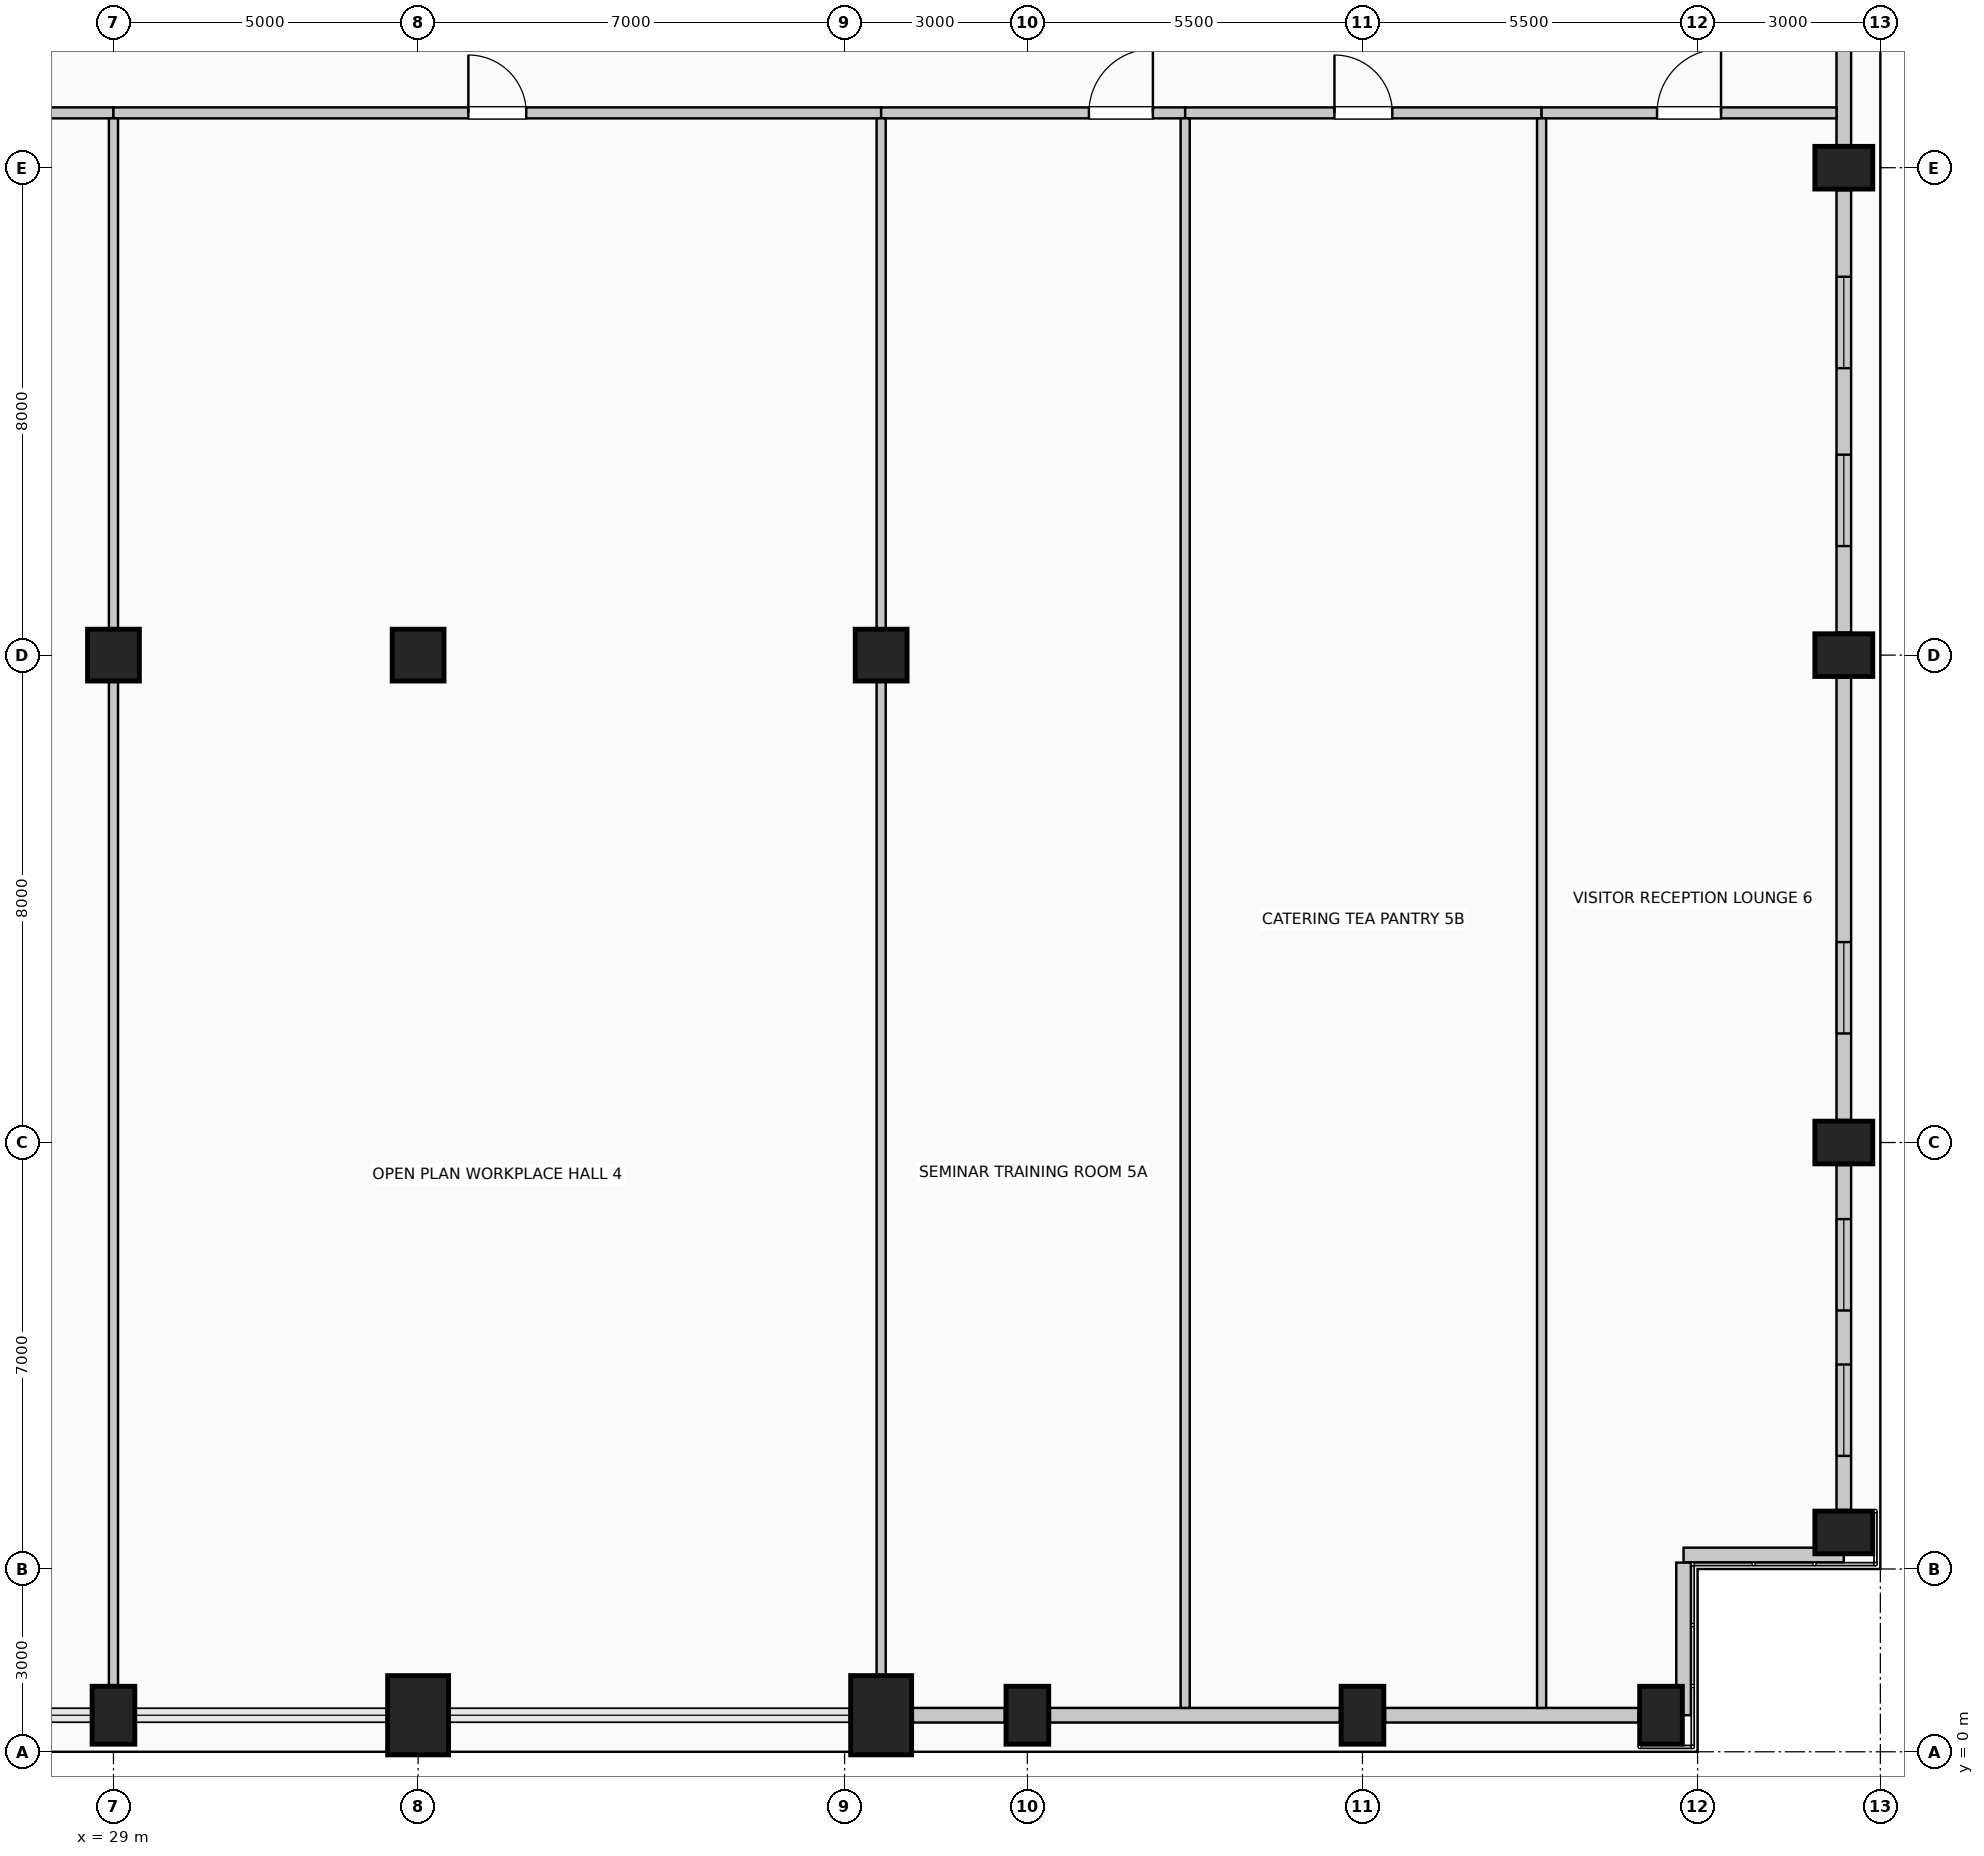
"""IFC4 building model, lengths in metres.
Left out: names, types, materials, properties, quantities, classifications, styles, units other than length and angle.
Written with IfcOpenShell. Run it as: python <this file> out.ifc"""

import sys

from ifc_helpers import new_model, si_unit, direction, frame, frame_2d, origin, origin_2d, place, context, subcontext, project, spatial, rectangle, circle, extrude, element, fill, save


model = new_model("IFC4")
c1 = context("Model", 3, precision=1e-05, world=origin(), true_north=direction((0.0, 1.0)))
c2 = subcontext(c1, "Body", "Model", "MODEL_VIEW")
j1 = project(units=[si_unit("LENGTHUNIT", "METRE"), si_unit("PLANEANGLEUNIT", "RADIAN")], contexts=[c1])
p1 = place(None, origin())
s1 = spatial("IfcSite", under=j1, at=p1, CompositionType="ELEMENT")
p2 = place(p1, origin())
s2 = spatial("IfcBuilding", under=s1, at=p2, CompositionType="ELEMENT")
p3 = place(p2, frame((0.0, 0.0, 285.0)))
s3 = spatial("IfcBuildingStorey", under=s2, at=p3, CompositionType="ELEMENT", Elevation=285.0)
p4 = place(p3, frame((29.0, 0.6, 0.0), z_axis=(0.0, 0.0, 1.0), x_axis=(1.0, 0.0, 0.0)))
e1 = element("IfcColumn", 1, at=p4, inside=s3, PredefinedType="COLUMN", context=c2, shape_type="SweptSolid", body=[
    extrude(rectangle(XDim=0.7, YDim=0.95, at=origin_2d()), origin(), (0.0, 0.0, 1.0), 4.0),
])
for number, where, z_axis, x_axis in (
    (2, (34.0, 0.6, 0.0), (0.0, 0.0, 1.0), (1.0, 0.0, 0.0)),
    (3, (41.6, 0.6, 0.0), (0.0, 0.0, 1.0), (1.0, 0.0, 0.0)),
):
    element("IfcColumn", number, at=place(p3, frame(where, z_axis=z_axis, x_axis=x_axis)), inside=s3, PredefinedType="COLUMN", context=c2, shape_type="SweptSolid", body=[
        extrude(rectangle(XDim=1.0, YDim=1.3, at=origin_2d()), origin(), (0.0, 0.0, 1.0), 4.0),
    ])
for number, where, z_axis, x_axis in (
    (4, (44.0, 0.6, 0.0), (0.0, 0.0, 1.0), (1.0, 0.0, 0.0)),
    (5, (49.5, 0.6, 0.0), (0.0, 0.0, 1.0), (1.0, 0.0, 0.0)),
    (6, (54.4, 0.6, 0.0), (0.0, 0.0, 1.0), (1.0, 0.0, 0.0)),
    (7, (57.4, 3.6, 0.0), (0.0, 0.0, 1.0), (0.0, 1.0, 0.0)),
    (8, (57.4, 10.0, 0.0), (0.0, 0.0, 1.0), (0.0, 1.0, 0.0)),
    (9, (57.4, 18.0, 0.0), (0.0, 0.0, 1.0), (0.0, 1.0, 0.0)),
    (10, (57.4, 26.0, 0.0), (0.0, 0.0, 1.0), (0.0, 1.0, 0.0)),
):
    element("IfcColumn", number, at=place(p3, frame(where, z_axis=z_axis, x_axis=x_axis)), inside=s3, PredefinedType="COLUMN", context=c2, shape_type="SweptSolid", body=[
        extrude(rectangle(XDim=0.7, YDim=0.95, at=origin_2d()), origin(), (0.0, 0.0, 1.0), 4.0),
    ])
for number, where, z_axis, x_axis in (
    (11, (29.0, 18.0, 0.0), (0.0, 0.0, 1.0), (1.0, 0.0, 0.0)),
    (12, (41.6, 18.0, 0.0), (0.0, 0.0, 1.0), (1.0, 0.0, 0.0)),
    (13, (34.0, 18.0, 0.0), (0.0, 0.0, 1.0), (1.0, 0.0, 0.0)),
):
    element("IfcColumn", number, at=place(p3, frame(where, z_axis=z_axis, x_axis=x_axis)), inside=s3, PredefinedType="COLUMN", context=c2, shape_type="SweptSolid", body=[
        extrude(circle(Radius=0.425, at=origin_2d()), origin(), (0.0, 0.0, 1.0), 4.0),
    ])
p5 = place(p3, frame((43.63, 0.6, 0.0), z_axis=(0.0, 0.0, 1.0), x_axis=(-1.0, 0.0, 0.0)))
e14 = element("IfcWall", 14, at=p5, inside=s3, PredefinedType="SOLIDWALL", context=c2, shape_type="SweptSolid", body=[
    extrude(rectangle(XDim=1.51, YDim=0.24, at=frame_2d((0.755, 0.0))), origin(), (0.0, 0.0, 1.0), 2.165),
])
p6 = place(p3, frame((49.13, 0.6, 0.0), z_axis=(0.0, 0.0, 1.0), x_axis=(-1.0, 0.0, 0.0)))
e15 = element("IfcWall", 15, at=p6, inside=s3, PredefinedType="SOLIDWALL", context=c2, shape_type="SweptSolid", body=[
    extrude(rectangle(XDim=4.76, YDim=0.24, at=frame_2d((2.38, 0.0))), origin(), (0.0, 0.0, 1.0), 2.165),
])
p7 = place(p3, frame((54.03, 0.6, 0.0), z_axis=(0.0, 0.0, 1.0), x_axis=(-1.0, 0.0, 0.0)))
e16 = element("IfcWall", 16, at=p7, inside=s3, PredefinedType="SOLIDWALL", context=c2, shape_type="SweptSolid", body=[
    extrude(rectangle(XDim=4.16, YDim=0.24, at=frame_2d((2.08, 0.0))), origin(), (0.0, 0.0, 1.0), 2.165),
])
p8 = place(p3, frame((57.4, 9.63, 0.0), z_axis=(0.0, 0.0, 1.0), x_axis=(0.0, -1.0, 0.0)))
e17 = element("IfcWall", 17, at=p8, inside=s3, PredefinedType="SOLIDWALL", context=c2, shape_type="SweptSolid", body=[
    extrude(rectangle(XDim=5.66, YDim=0.24, at=frame_2d((2.83, 0.0))), origin(), (0.0, 0.0, 1.0), 3.015),
])
p9 = place(p8, frame((0.887, 0.0, 0.42)))
e18 = element("IfcOpeningElement", 18, at=p9, cuts=e17, PredefinedType="OPENING", context=c2, shape_type="SweptSolid", body=[
    extrude(rectangle(XDim=1.5, YDim=2.2, at=frame_2d((0.75, 1.1))), frame((0.0, 0.13, 0.0), z_axis=(0.0, -1.0, 0.0), x_axis=(1.0, 0.0, 0.0)), (0.0, 0.0, 1.0), 0.26),
])
p10 = place(p8, frame((3.273, 0.0, 0.42)))
e19 = element("IfcOpeningElement", 19, at=p10, cuts=e17, PredefinedType="OPENING", context=c2, shape_type="SweptSolid", body=[
    extrude(rectangle(XDim=1.5, YDim=2.2, at=frame_2d((0.75, 1.1))), frame((0.0, 0.13, 0.0), z_axis=(0.0, -1.0, 0.0), x_axis=(1.0, 0.0, 0.0)), (0.0, 0.0, 1.0), 0.26),
])
p11 = place(p3, frame((57.4, 17.63, 0.0), z_axis=(0.0, 0.0, 1.0), x_axis=(0.0, -1.0, 0.0)))
e20 = element("IfcWall", 20, at=p11, inside=s3, PredefinedType="SOLIDWALL", context=c2, shape_type="SweptSolid", body=[
    extrude(rectangle(XDim=7.26, YDim=0.24, at=frame_2d((3.63, 0.0))), origin(), (0.0, 0.0, 1.0), 3.015),
])
p12 = place(p11, frame((4.34, 0.0, 0.42)))
e21 = element("IfcOpeningElement", 21, at=p12, cuts=e20, PredefinedType="OPENING", context=c2, shape_type="SweptSolid", body=[
    extrude(rectangle(XDim=1.5, YDim=2.2, at=frame_2d((0.75, 1.1))), frame((0.0, 0.13, 0.0), z_axis=(0.0, -1.0, 0.0), x_axis=(1.0, 0.0, 0.0)), (0.0, 0.0, 1.0), 0.26),
])
p13 = place(p3, frame((57.4, 25.63, 0.0), z_axis=(0.0, 0.0, 1.0), x_axis=(0.0, -1.0, 0.0)))
e22 = element("IfcWall", 22, at=p13, inside=s3, PredefinedType="SOLIDWALL", context=c2, shape_type="SweptSolid", body=[
    extrude(rectangle(XDim=7.26, YDim=0.24, at=frame_2d((3.63, 0.0))), origin(), (0.0, 0.0, 1.0), 3.015),
])
p14 = place(p13, frame((1.42, 0.0, 0.42)))
e23 = element("IfcOpeningElement", 23, at=p14, cuts=e22, PredefinedType="OPENING", context=c2, shape_type="SweptSolid", body=[
    extrude(rectangle(XDim=1.5, YDim=2.2, at=frame_2d((0.75, 1.1))), frame((0.0, 0.13, 0.0), z_axis=(0.0, -1.0, 0.0), x_axis=(1.0, 0.0, 0.0)), (0.0, 0.0, 1.0), 0.26),
])
p15 = place(p13, frame((4.34, 0.0, 0.42)))
e24 = element("IfcOpeningElement", 24, at=p15, cuts=e22, PredefinedType="OPENING", context=c2, shape_type="SweptSolid", body=[
    extrude(rectangle(XDim=1.5, YDim=2.2, at=frame_2d((0.75, 1.1))), frame((0.0, 0.13, 0.0), z_axis=(0.0, -1.0, 0.0), x_axis=(1.0, 0.0, 0.0)), (0.0, 0.0, 1.0), 0.26),
])
p16 = place(p3, frame((57.4, 33.63, 0.0), z_axis=(0.0, 0.0, 1.0), x_axis=(0.0, -1.0, 0.0)))
e25 = element("IfcWall", 25, at=p16, inside=s3, PredefinedType="SOLIDWALL", context=c2, shape_type="SweptSolid", body=[
    extrude(rectangle(XDim=7.26, YDim=0.24, at=frame_2d((3.63, 0.0))), origin(), (0.0, 0.0, 1.0), 3.015),
])
p17 = place(p3, frame((57.4, 3.23, 0.0), z_axis=(0.0, 0.0, 1.0), x_axis=(-1.0, 0.0, 0.0)))
e26 = element("IfcWall", 26, at=p17, inside=s3, PredefinedType="SOLIDWALL", context=c2, shape_type="SweptSolid", body=[
    extrude(rectangle(XDim=2.63, YDim=0.24, at=frame_2d((1.315, 0.0))), origin(), (0.0, 0.0, 1.0), 2.165),
])
p18 = place(p3, frame((54.77, 3.105, 0.0), z_axis=(0.0, 0.0, 1.0), x_axis=(0.0, -1.0, 0.0)))
e27 = element("IfcWall", 27, at=p18, inside=s3, PredefinedType="SOLIDWALL", context=c2, shape_type="SweptSolid", body=[
    extrude(rectangle(XDim=2.505, YDim=0.24, at=frame_2d((1.252, 0.0))), origin(), (0.0, 0.0, 1.0), 2.165),
])
p19 = place(p3, frame((23.1, 26.9, 0.0), z_axis=(0.0, 0.0, 1.0), x_axis=(1.0, 0.0, 0.0)))
e28 = element("IfcWall", 28, at=p19, inside=s3, PredefinedType="PARTITIONING", context=c2, shape_type="SweptSolid", body=[
    extrude(rectangle(XDim=5.9, YDim=0.18, at=frame_2d((2.95, 0.0))), origin(), (0.0, 0.0, 1.0), 3.775),
])
p20 = place(p19, frame((2.51, 0.0, 0.0)))
e29 = element("IfcOpeningElement", 29, at=p20, cuts=e28, PredefinedType="OPENING", context=c2, shape_type="SweptSolid", body=[
    extrude(rectangle(XDim=0.88, YDim=2.1, at=frame_2d((0.44, 1.05))), frame((0.0, 0.1, 0.0), z_axis=(0.0, -1.0, 0.0), x_axis=(1.0, 0.0, 0.0)), (0.0, 0.0, 1.0), 0.2),
])
p21 = place(p3, frame((29.0, 26.9, 0.0), z_axis=(0.0, 0.0, 1.0), x_axis=(1.0, 0.0, 0.0)))
e30 = element("IfcWall", 30, at=p21, inside=s3, PredefinedType="PARTITIONING", context=c2, shape_type="SweptSolid", body=[
    extrude(rectangle(XDim=12.6, YDim=0.18, at=frame_2d((6.3, 0.0))), origin(), (0.0, 0.0, 1.0), 3.775),
])
p22 = place(p21, frame((5.825, 0.0, 0.0)))
e31 = element("IfcOpeningElement", 31, at=p22, cuts=e30, PredefinedType="OPENING", context=c2, shape_type="SweptSolid", body=[
    extrude(rectangle(XDim=0.95, YDim=2.15, at=frame_2d((0.475, 1.075))), frame((0.0, 0.1, 0.0), z_axis=(0.0, -1.0, 0.0), x_axis=(1.0, 0.0, 0.0)), (0.0, 0.0, 1.0), 0.2),
])
p23 = place(p3, frame((41.6, 26.9, 0.0), z_axis=(0.0, 0.0, 1.0), x_axis=(1.0, 0.0, 0.0)))
e32 = element("IfcWall", 32, at=p23, inside=s3, PredefinedType="PARTITIONING", context=c2, shape_type="SweptSolid", body=[
    extrude(rectangle(XDim=4.99, YDim=0.18, at=frame_2d((2.495, 0.0))), origin(), (0.0, 0.0, 1.0), 3.775),
])
p24 = place(p23, frame((3.41, 0.0, 0.0)))
e33 = element("IfcOpeningElement", 33, at=p24, cuts=e32, PredefinedType="OPENING", context=c2, shape_type="SweptSolid", body=[
    extrude(rectangle(XDim=1.05, YDim=2.15, at=frame_2d((0.525, 1.075))), frame((0.0, 0.1, 0.0), z_axis=(0.0, -1.0, 0.0), x_axis=(1.0, 0.0, 0.0)), (0.0, 0.0, 1.0), 0.2),
])
p25 = place(p3, frame((46.59, 26.9, 0.0), z_axis=(0.0, 0.0, 1.0), x_axis=(1.0, 0.0, 0.0)))
e34 = element("IfcWall", 34, at=p25, inside=s3, PredefinedType="PARTITIONING", context=c2, shape_type="SweptSolid", body=[
    extrude(rectangle(XDim=5.85, YDim=0.18, at=frame_2d((2.925, 0.0))), origin(), (0.0, 0.0, 1.0), 3.775),
])
p26 = place(p25, frame((2.45, 0.0, 0.0)))
e35 = element("IfcOpeningElement", 35, at=p26, cuts=e34, PredefinedType="OPENING", context=c2, shape_type="SweptSolid", body=[
    extrude(rectangle(XDim=0.95, YDim=2.15, at=frame_2d((0.475, 1.075))), frame((0.0, 0.1, 0.0), z_axis=(0.0, -1.0, 0.0), x_axis=(1.0, 0.0, 0.0)), (0.0, 0.0, 1.0), 0.2),
])
p27 = place(p3, frame((52.44, 26.9, 0.0), z_axis=(0.0, 0.0, 1.0), x_axis=(1.0, 0.0, 0.0)))
e36 = element("IfcWall", 36, at=p27, inside=s3, PredefinedType="PARTITIONING", context=c2, shape_type="SweptSolid", body=[
    extrude(rectangle(XDim=4.84, YDim=0.18, at=frame_2d((2.42, 0.0))), origin(), (0.0, 0.0, 1.0), 3.775),
])
p28 = place(p27, frame((1.895, 0.0, 0.0)))
e37 = element("IfcOpeningElement", 37, at=p28, cuts=e36, PredefinedType="OPENING", context=c2, shape_type="SweptSolid", body=[
    extrude(rectangle(XDim=1.05, YDim=2.15, at=frame_2d((0.525, 1.075))), frame((0.0, 0.1, 0.0), z_axis=(0.0, -1.0, 0.0), x_axis=(1.0, 0.0, 0.0)), (0.0, 0.0, 1.0), 0.2),
])
p29 = place(p3, frame((29.0, 1.075, 0.0), z_axis=(0.0, 0.0, 1.0), x_axis=(0.0, 1.0, 0.0)))
e38 = element("IfcWall", 38, at=p29, inside=s3, PredefinedType="PARTITIONING", context=c2, shape_type="SweptSolid", body=[
    extrude(rectangle(XDim=16.5, YDim=0.15, at=frame_2d((8.25, 0.0))), origin(), (0.0, 0.0, 1.0), 3.22),
])
p30 = place(p3, frame((29.0, 18.425, 0.0), z_axis=(0.0, 0.0, 1.0), x_axis=(0.0, 1.0, 0.0)))
e39 = element("IfcWall", 39, at=p30, inside=s3, PredefinedType="PARTITIONING", context=c2, shape_type="SweptSolid", body=[
    extrude(rectangle(XDim=8.385, YDim=0.15, at=frame_2d((4.192, 0.0))), origin(), (0.0, 0.0, 1.0), 3.22),
])
p31 = place(p3, frame((41.6, 1.25, 0.0), z_axis=(0.0, 0.0, 1.0), x_axis=(0.0, 1.0, 0.0)))
e40 = element("IfcWall", 40, at=p31, inside=s3, PredefinedType="PARTITIONING", context=c2, shape_type="SweptSolid", body=[
    extrude(rectangle(XDim=16.325, YDim=0.15, at=frame_2d((8.163, 0.0))), origin(), (0.0, 0.0, 1.0), 3.22),
])
p32 = place(p3, frame((41.6, 18.425, 0.0), z_axis=(0.0, 0.0, 1.0), x_axis=(0.0, 1.0, 0.0)))
e41 = element("IfcWall", 41, at=p32, inside=s3, PredefinedType="PARTITIONING", context=c2, shape_type="SweptSolid", body=[
    extrude(rectangle(XDim=8.385, YDim=0.15, at=frame_2d((4.192, 0.0))), origin(), (0.0, 0.0, 1.0), 3.22),
])
for number, where, z_axis, x_axis in (
    (42, (46.59, 0.72, 0.0), (0.0, 0.0, 1.0), (0.0, 1.0, 0.0)),
    (43, (52.44, 0.72, 0.0), (0.0, 0.0, 1.0), (0.0, 1.0, 0.0)),
):
    element("IfcWall", number, at=place(p3, frame(where, z_axis=z_axis, x_axis=x_axis)), inside=s3, PredefinedType="PARTITIONING", context=c2, shape_type="SweptSolid", body=[
        extrude(rectangle(XDim=26.09, YDim=0.15, at=frame_2d((13.045, 0.0))), origin(), (0.0, 0.0, 1.0), 3.775),
    ])
p33 = place(p9, origin())
e44 = element("IfcWindow", 44, at=p33, inside=s3, PartitioningType="SINGLE_PANEL", PredefinedType="WINDOW", context=c2, shape_type="SweptSolid", body=[
    extrude(rectangle(XDim=1.5, YDim=2.2, at=frame_2d((0.75, 1.1))), frame((0.0, 0.03, 0.0), z_axis=(0.0, -1.0, 0.0), x_axis=(1.0, 0.0, 0.0)), (0.0, 0.0, 1.0), 0.06),
])
fill(e18, e44)
p34 = place(p10, origin())
e45 = element("IfcWindow", 45, at=p34, inside=s3, PartitioningType="SINGLE_PANEL", PredefinedType="WINDOW", context=c2, shape_type="SweptSolid", body=[
    extrude(rectangle(XDim=1.5, YDim=2.2, at=frame_2d((0.75, 1.1))), frame((0.0, 0.03, 0.0), z_axis=(0.0, -1.0, 0.0), x_axis=(1.0, 0.0, 0.0)), (0.0, 0.0, 1.0), 0.06),
])
fill(e19, e45)
p35 = place(p12, origin())
e46 = element("IfcWindow", 46, at=p35, inside=s3, PartitioningType="SINGLE_PANEL", PredefinedType="WINDOW", context=c2, shape_type="SweptSolid", body=[
    extrude(rectangle(XDim=1.5, YDim=2.2, at=frame_2d((0.75, 1.1))), frame((0.0, 0.03, 0.0), z_axis=(0.0, -1.0, 0.0), x_axis=(1.0, 0.0, 0.0)), (0.0, 0.0, 1.0), 0.06),
])
fill(e21, e46)
p36 = place(p14, origin())
e47 = element("IfcWindow", 47, at=p36, inside=s3, PartitioningType="SINGLE_PANEL", PredefinedType="WINDOW", context=c2, shape_type="SweptSolid", body=[
    extrude(rectangle(XDim=1.5, YDim=2.2, at=frame_2d((0.75, 1.1))), frame((0.0, 0.03, 0.0), z_axis=(0.0, -1.0, 0.0), x_axis=(1.0, 0.0, 0.0)), (0.0, 0.0, 1.0), 0.06),
])
fill(e23, e47)
p37 = place(p15, origin())
e48 = element("IfcWindow", 48, at=p37, inside=s3, PartitioningType="SINGLE_PANEL", PredefinedType="WINDOW", context=c2, shape_type="SweptSolid", body=[
    extrude(rectangle(XDim=1.5, YDim=2.2, at=frame_2d((0.75, 1.1))), frame((0.0, 0.03, 0.0), z_axis=(0.0, -1.0, 0.0), x_axis=(1.0, 0.0, 0.0)), (0.0, 0.0, 1.0), 0.06),
])
fill(e24, e48)
p38 = place(p22, origin())
e49 = element("IfcDoor", 49, at=p38, inside=s3, OperationType="SINGLE_SWING_LEFT", PredefinedType="DOOR", context=c2, shape_type="SweptSolid", body=[
    extrude(rectangle(XDim=0.95, YDim=2.15, at=frame_2d((0.475, 1.075))), frame((0.0, 0.025, 0.0), z_axis=(0.0, -1.0, 0.0), x_axis=(1.0, 0.0, 0.0)), (0.0, 0.0, 1.0), 0.05),
])
fill(e31, e49)
p39 = place(p24, origin())
e50 = element("IfcDoor", 50, at=p39, inside=s3, OperationType="SINGLE_SWING_RIGHT", PredefinedType="DOOR", context=c2, shape_type="SweptSolid", body=[
    extrude(rectangle(XDim=1.05, YDim=2.15, at=frame_2d((0.525, 1.075))), frame((0.0, 0.025, 0.0), z_axis=(0.0, -1.0, 0.0), x_axis=(1.0, 0.0, 0.0)), (0.0, 0.0, 1.0), 0.05),
])
fill(e33, e50)
p40 = place(p26, origin())
e51 = element("IfcDoor", 51, at=p40, inside=s3, OperationType="SINGLE_SWING_LEFT", PredefinedType="DOOR", context=c2, shape_type="SweptSolid", body=[
    extrude(rectangle(XDim=0.95, YDim=2.15, at=frame_2d((0.475, 1.075))), frame((0.0, 0.025, 0.0), z_axis=(0.0, -1.0, 0.0), x_axis=(1.0, 0.0, 0.0)), (0.0, 0.0, 1.0), 0.05),
])
fill(e35, e51)
p41 = place(p28, origin())
e52 = element("IfcDoor", 52, at=p41, inside=s3, OperationType="SINGLE_SWING_RIGHT", PredefinedType="DOOR", context=c2, shape_type="SweptSolid", body=[
    extrude(rectangle(XDim=1.05, YDim=2.15, at=frame_2d((0.525, 1.075))), frame((0.0, 0.025, 0.0), z_axis=(0.0, -1.0, 0.0), x_axis=(1.0, 0.0, 0.0)), (0.0, 0.0, 1.0), 0.05),
])
fill(e37, e52)
save(model, sys.argv[1])
